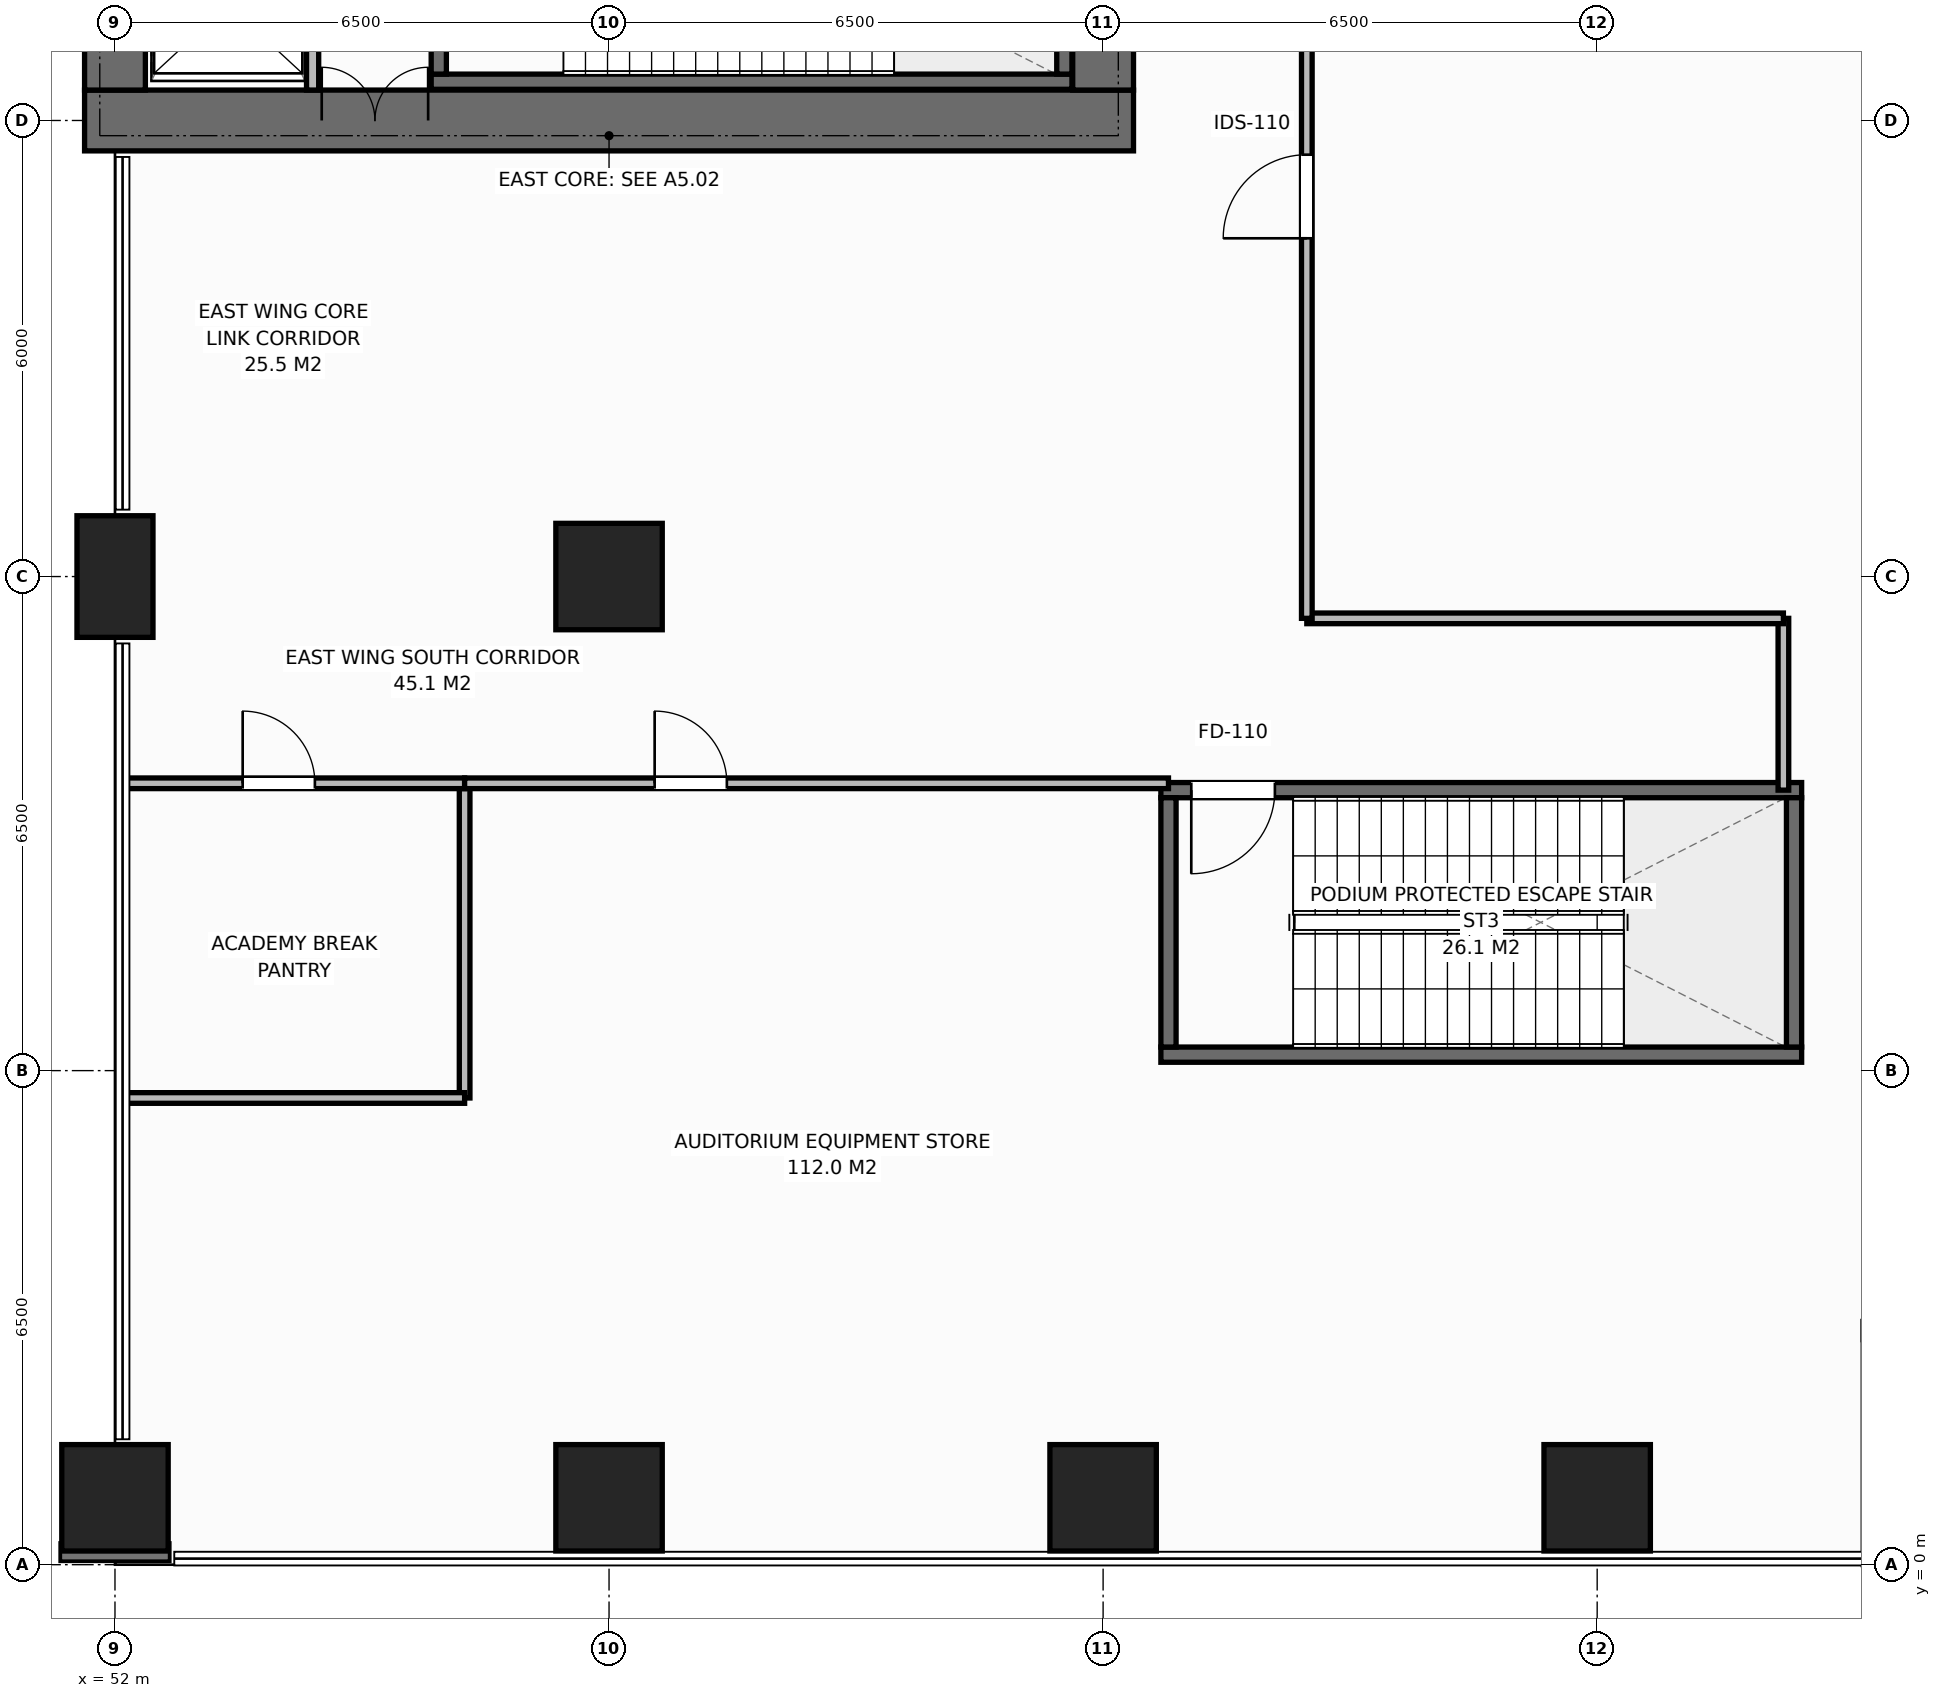
"""IFC4 building model, lengths in metres.
Left out: names, types, materials, properties, quantities, classifications, styles, units other than length and angle.
Written with IfcOpenShell. Run it as: python <this file> out.ifc"""

import sys

from ifc_helpers import new_model, si_unit, direction, frame, frame_2d, origin, origin_2d, place, context, subcontext, project, spatial, rectangle, extrude, element, fill, save


model = new_model("IFC4")
c1 = context("Model", 3, precision=1e-05, world=origin(), true_north=direction((0.0, 1.0)))
c2 = subcontext(c1, "Body", "Model", "MODEL_VIEW")
j1 = project(units=[si_unit("LENGTHUNIT", "METRE"), si_unit("PLANEANGLEUNIT", "RADIAN")], contexts=[c1])
p1 = place(None, origin())
s1 = spatial("IfcSite", under=j1, at=p1, CompositionType="ELEMENT")
p2 = place(p1, origin())
s2 = spatial("IfcBuilding", under=s1, at=p2, CompositionType="ELEMENT")
p3 = place(p2, frame((0.0, 0.0, 11.5)))
s3 = spatial("IfcBuildingStorey", under=s2, at=p3, CompositionType="ELEMENT", Elevation=11.5)
p4 = place(p3, frame((51.6, 19.0, 0.0), z_axis=(0.0, 0.0, 1.0), x_axis=(1.0, 0.0, 0.0)))
e1 = element("IfcWall", 1, at=p4, inside=s3, PredefinedType="SHEAR", context=c2, shape_type="SweptSolid", body=[
    extrude(rectangle(XDim=13.8, YDim=0.8, at=frame_2d((6.9, 0.0))), origin(), (0.0, 0.0, 1.0), 5.5),
])
p5 = place(p4, frame((3.12, 0.0, 0.0)))
e2 = element("IfcOpeningElement", 2, at=p5, cuts=e1, PredefinedType="OPENING", context=c2, shape_type="SweptSolid", body=[
    extrude(rectangle(XDim=1.4, YDim=2.2, at=frame_2d((0.7, 1.1))), frame((0.0, 0.41, 0.0), z_axis=(0.0, -1.0, 0.0), x_axis=(1.0, 0.0, 0.0)), (0.0, 0.0, 1.0), 0.82),
])
p6 = place(p3, frame((52.0, 19.4, 0.0), z_axis=(0.0, 0.0, 1.0), x_axis=(0.0, 1.0, 0.0)))
e3 = element("IfcWall", 3, at=p6, inside=s3, PredefinedType="SHEAR", context=c2, shape_type="SweptSolid", body=[
    extrude(rectangle(XDim=13.2, YDim=0.8, at=frame_2d((6.6, 0.0))), origin(), (0.0, 0.0, 1.0), 5.5),
])
p7 = place(p3, frame((65.0, 19.4, 0.0), z_axis=(0.0, 0.0, 1.0), x_axis=(0.0, 1.0, 0.0)))
e4 = element("IfcWall", 4, at=p7, inside=s3, PredefinedType="SHEAR", context=c2, shape_type="SweptSolid", body=[
    extrude(rectangle(XDim=13.2, YDim=0.8, at=frame_2d((6.6, 0.0))), origin(), (0.0, 0.0, 1.0), 5.5),
])
p8 = place(p7, frame((8.05, 0.0, 0.0)))
e5 = element("IfcOpeningElement", 5, at=p8, cuts=e4, PredefinedType="OPENING", context=c2, shape_type="SweptSolid", body=[
    extrude(rectangle(XDim=1.3, YDim=2.2, at=frame_2d((0.65, 1.1))), frame((0.0, 0.41, 0.0), z_axis=(0.0, -1.0, 0.0), x_axis=(1.0, 0.0, 0.0)), (0.0, 0.0, 1.0), 0.82),
])
p9 = place(p3, frame((56.16, 19.51, 0.0), z_axis=(0.0, 0.0, 1.0), x_axis=(1.0, 0.0, 0.0)))
e6 = element("IfcWall", 6, at=p9, inside=s3, PredefinedType="SHEAR", context=c2, shape_type="SweptSolid", body=[
    extrude(rectangle(XDim=8.43, YDim=0.2, at=frame_2d((4.215, 0.0))), origin(), (0.0, 0.0, 1.0), 5.5),
])
for number, where, z_axis, x_axis in (
    (7, (56.26, 19.61, 0.0), (0.0, 0.0, 1.0), (0.0, 1.0, 0.0)),
    (8, (64.49, 19.61, 0.0), (0.0, 0.0, 1.0), (0.0, 1.0, 0.0)),
):
    element("IfcWall", number, at=place(p3, frame(where, z_axis=z_axis, x_axis=x_axis)), inside=s3, PredefinedType="SHEAR", context=c2, shape_type="SweptSolid", body=[
        extrude(rectangle(XDim=3.28, YDim=0.2, at=frame_2d((1.64, 0.0))), origin(), (0.0, 0.0, 1.0), 5.5),
    ])
p10 = place(p3, frame((65.76, 6.71, 0.0), z_axis=(0.0, 0.0, 1.0), x_axis=(1.0, 0.0, 0.0)))
e9 = element("IfcWall", 9, at=p10, inside=s3, PredefinedType="SHEAR", context=c2, shape_type="SweptSolid", body=[
    extrude(rectangle(XDim=8.43, YDim=0.2, at=frame_2d((4.215, 0.0))), origin(), (0.0, 0.0, 1.0), 5.5),
])
p11 = place(p3, frame((65.76, 10.19, 0.0), z_axis=(0.0, 0.0, 1.0), x_axis=(1.0, 0.0, 0.0)))
e10 = element("IfcWall", 10, at=p11, inside=s3, PredefinedType="SHEAR", context=c2, shape_type="SweptSolid", body=[
    extrude(rectangle(XDim=8.43, YDim=0.2, at=frame_2d((4.215, 0.0))), origin(), (0.0, 0.0, 1.0), 5.5),
])
p12 = place(p11, frame((0.4, 0.0, 0.0)))
e11 = element("IfcOpeningElement", 11, at=p12, cuts=e10, PredefinedType="OPENING", context=c2, shape_type="SweptSolid", body=[
    extrude(rectangle(XDim=1.1, YDim=2.15, at=frame_2d((0.55, 1.075))), frame((0.0, 0.11, 0.0), z_axis=(0.0, -1.0, 0.0), x_axis=(1.0, 0.0, 0.0)), (0.0, 0.0, 1.0), 0.22),
])
for number, where, z_axis, x_axis in (
    (12, (65.86, 6.81, 0.0), (0.0, 0.0, 1.0), (0.0, 1.0, 0.0)),
    (13, (74.09, 6.81, 0.0), (0.0, 0.0, 1.0), (0.0, 1.0, 0.0)),
):
    element("IfcWall", number, at=place(p3, frame(where, z_axis=z_axis, x_axis=x_axis)), inside=s3, PredefinedType="SHEAR", context=c2, shape_type="SweptSolid", body=[
        extrude(rectangle(XDim=3.28, YDim=0.2, at=frame_2d((1.64, 0.0))), origin(), (0.0, 0.0, 1.0), 5.5),
    ])
p13 = place(p3, frame((58.5, 13.0, 0.0), z_axis=(0.0, 0.0, 1.0), x_axis=(1.0, 0.0, 0.0)))
e14 = element("IfcColumn", 14, at=p13, inside=s3, PredefinedType="COLUMN", context=c2, shape_type="SweptSolid", body=[
    extrude(rectangle(XDim=1.4, YDim=1.4, at=origin_2d()), origin(), (0.0, 0.0, 1.0), 5.5),
])
p14 = place(p3, frame((52.0, 13.0, 0.0), z_axis=(0.0, 0.0, 1.0), x_axis=(1.0, 0.0, 0.0)))
e15 = element("IfcColumn", 15, at=p14, inside=s3, PredefinedType="PILASTER", context=c2, shape_type="SweptSolid", body=[
    extrude(rectangle(XDim=1.0, YDim=1.6, at=origin_2d()), origin(), (0.0, 0.0, 1.0), 5.5),
])
for number, where, z_axis, x_axis in (
    (16, (52.0, 0.88, 0.0), (0.0, 0.0, 1.0), (1.0, 0.0, 0.0)),
    (17, (58.5, 0.88, 0.0), (0.0, 0.0, 1.0), (1.0, 0.0, 0.0)),
    (18, (65.0, 0.88, 0.0), (0.0, 0.0, 1.0), (1.0, 0.0, 0.0)),
    (19, (71.5, 0.88, 0.0), (0.0, 0.0, 1.0), (1.0, 0.0, 0.0)),
):
    element("IfcColumn", number, at=place(p3, frame(where, z_axis=z_axis, x_axis=x_axis)), inside=s3, PredefinedType="COLUMN", context=c2, shape_type="SweptSolid", body=[
        extrude(rectangle(XDim=1.4, YDim=1.4, at=origin_2d()), origin(), (0.0, 0.0, 1.0), 5.5),
    ])
p15 = place(p3, frame((54.6, 19.4, 0.0), z_axis=(0.0, 0.0, 1.0), x_axis=(0.0, 1.0, 0.0)))
e20 = element("IfcWall", 20, at=p15, inside=s3, PredefinedType="STANDARD", context=c2, shape_type="SweptSolid", body=[
    extrude(rectangle(XDim=13.2, YDim=0.16, at=frame_2d((6.6, 0.0))), origin(), (0.0, 0.0, 1.0), 5.22),
])
p16 = place(p15, frame((0.55, 0.0, 0.0)))
e21 = element("IfcOpeningElement", 21, at=p16, cuts=e20, PredefinedType="OPENING", context=c2, shape_type="SweptSolid", body=[
    extrude(rectangle(XDim=1.1, YDim=2.2, at=frame_2d((0.55, 1.1))), frame((0.0, 0.09, 0.0), z_axis=(0.0, -1.0, 0.0), x_axis=(1.0, 0.0, 0.0)), (0.0, 0.0, 1.0), 0.18),
])
p17 = place(p15, frame((2.7, 0.0, 0.0)))
e22 = element("IfcOpeningElement", 22, at=p17, cuts=e20, PredefinedType="OPENING", context=c2, shape_type="SweptSolid", body=[
    extrude(rectangle(XDim=1.1, YDim=2.2, at=frame_2d((0.55, 1.1))), frame((0.0, 0.09, 0.0), z_axis=(0.0, -1.0, 0.0), x_axis=(1.0, 0.0, 0.0)), (0.0, 0.0, 1.0), 0.18),
])
p18 = place(p3, frame((56.6, 6.14, 0.0), z_axis=(0.0, 0.0, 1.0), x_axis=(0.0, 1.0, 0.0)))
e23 = element("IfcWall", 23, at=p18, inside=s3, PredefinedType="PARTITIONING", context=c2, shape_type="SweptSolid", body=[
    extrude(rectangle(XDim=4.14, YDim=0.14, at=frame_2d((2.07, 0.0))), origin(), (0.0, 0.0, 1.0), 5.22),
])
p19 = place(p3, frame((52.08, 6.14, 0.0), z_axis=(0.0, 0.0, 1.0), x_axis=(1.0, 0.0, 0.0)))
e24 = element("IfcWall", 24, at=p19, inside=s3, PredefinedType="PARTITIONING", context=c2, shape_type="SweptSolid", body=[
    extrude(rectangle(XDim=4.52, YDim=0.14, at=frame_2d((2.26, 0.0))), origin(), (0.0, 0.0, 1.0), 5.22),
])
p20 = place(p3, frame((73.95, 10.19, 0.0), z_axis=(0.0, 0.0, 1.0), x_axis=(0.0, 1.0, 0.0)))
e25 = element("IfcWall", 25, at=p20, inside=s3, PredefinedType="PARTITIONING", context=c2, shape_type="SweptSolid", body=[
    extrude(rectangle(XDim=2.26, YDim=0.14, at=frame_2d((1.13, 0.0))), origin(), (0.0, 0.0, 1.0), 5.22),
])
p21 = place(p3, frame((67.68, 12.45, 0.0), z_axis=(0.0, 0.0, 1.0), x_axis=(1.0, 0.0, 0.0)))
e26 = element("IfcWall", 26, at=p21, inside=s3, PredefinedType="PARTITIONING", context=c2, shape_type="SweptSolid", body=[
    extrude(rectangle(XDim=6.27, YDim=0.14, at=frame_2d((3.135, 0.0))), origin(), (0.0, 0.0, 1.0), 5.22),
])
p22 = place(p3, frame((67.68, 12.45, 0.0), z_axis=(0.0, 0.0, 1.0), x_axis=(0.0, 1.0, 0.0)))
e27 = element("IfcWall", 27, at=p22, inside=s3, PredefinedType="PARTITIONING", context=c2, shape_type="SweptSolid", body=[
    extrude(rectangle(XDim=23.13, YDim=0.14, at=frame_2d((11.565, 0.0))), origin(), (0.0, 0.0, 1.0), 5.22),
])
p23 = place(p22, frame((5.0, 0.0, 0.0)))
e28 = element("IfcOpeningElement", 28, at=p23, cuts=e27, PredefinedType="OPENING", context=c2, shape_type="SweptSolid", body=[
    extrude(rectangle(XDim=1.1, YDim=2.15, at=frame_2d((0.55, 1.075))), frame((0.0, 0.08, 0.0), z_axis=(0.0, -1.0, 0.0), x_axis=(1.0, 0.0, 0.0)), (0.0, 0.0, 1.0), 0.16),
])
p24 = place(p3, frame((52.08, 10.28, 0.0), z_axis=(0.0, 0.0, 1.0), x_axis=(1.0, 0.0, 0.0)))
e29 = element("IfcWall", 29, at=p24, inside=s3, PredefinedType="PARTITIONING", context=c2, shape_type="SweptSolid", body=[
    extrude(rectangle(XDim=4.52, YDim=0.14, at=frame_2d((2.26, 0.0))), origin(), (0.0, 0.0, 1.0), 5.22),
])
p25 = place(p24, frame((1.6, 0.0, 0.0)))
e30 = element("IfcOpeningElement", 30, at=p25, cuts=e29, PredefinedType="OPENING", context=c2, shape_type="SweptSolid", body=[
    extrude(rectangle(XDim=0.95, YDim=2.15, at=frame_2d((0.475, 1.075))), frame((0.0, 0.08, 0.0), z_axis=(0.0, -1.0, 0.0), x_axis=(1.0, 0.0, 0.0)), (0.0, 0.0, 1.0), 0.16),
])
p26 = place(p3, frame((56.6, 10.28, 0.0), z_axis=(0.0, 0.0, 1.0), x_axis=(1.0, 0.0, 0.0)))
e31 = element("IfcWall", 31, at=p26, inside=s3, PredefinedType="PARTITIONING", context=c2, shape_type="SweptSolid", body=[
    extrude(rectangle(XDim=9.26, YDim=0.14, at=frame_2d((4.63, 0.0))), origin(), (0.0, 0.0, 1.0), 5.22),
])
p27 = place(p26, frame((2.5, 0.0, 0.0)))
e32 = element("IfcOpeningElement", 32, at=p27, cuts=e31, PredefinedType="OPENING", context=c2, shape_type="SweptSolid", body=[
    extrude(rectangle(XDim=0.95, YDim=2.15, at=frame_2d((0.475, 1.075))), frame((0.0, 0.08, 0.0), z_axis=(0.0, -1.0, 0.0), x_axis=(1.0, 0.0, 0.0)), (0.0, 0.0, 1.0), 0.16),
])
p28 = place(p5, origin())
e33 = element("IfcDoor", 33, at=p28, inside=s3, OperationType="DOUBLE_DOOR_SINGLE_SWING", PredefinedType="DOOR", context=c2, shape_type="SweptSolid", body=[
    extrude(rectangle(XDim=1.4, YDim=2.2, at=frame_2d((0.7, 1.1))), frame((0.0, 0.125, 0.0), z_axis=(0.0, -1.0, 0.0), x_axis=(1.0, 0.0, 0.0)), (0.0, 0.0, 1.0), 0.05),
])
fill(e2, e33)
p29 = place(p12, origin())
e34 = element("IfcDoor", 34, at=p29, inside=s3, OperationType="SINGLE_SWING_RIGHT", PredefinedType="DOOR", context=c2, shape_type="SweptSolid", body=[
    extrude(rectangle(XDim=1.1, YDim=2.15, at=frame_2d((0.55, 1.075))), frame((0.0, 0.025, 0.0), z_axis=(0.0, -1.0, 0.0), x_axis=(1.0, 0.0, 0.0)), (0.0, 0.0, 1.0), 0.05),
])
fill(e11, e34)
p30 = place(p23, origin())
e35 = element("IfcDoor", 35, at=p30, inside=s3, OperationType="SINGLE_SWING_LEFT", PredefinedType="DOOR", context=c2, shape_type="SweptSolid", body=[
    extrude(rectangle(XDim=1.1, YDim=2.15, at=frame_2d((0.55, 1.075))), frame((0.0, 0.025, 0.0), z_axis=(0.0, -1.0, 0.0), x_axis=(1.0, 0.0, 0.0)), (0.0, 0.0, 1.0), 0.05),
])
fill(e28, e35)
p31 = place(p25, origin())
e36 = element("IfcDoor", 36, at=p31, inside=s3, OperationType="SINGLE_SWING_LEFT", PredefinedType="DOOR", context=c2, shape_type="SweptSolid", body=[
    extrude(rectangle(XDim=0.95, YDim=2.15, at=frame_2d((0.475, 1.075))), frame((0.0, 0.025, 0.0), z_axis=(0.0, -1.0, 0.0), x_axis=(1.0, 0.0, 0.0)), (0.0, 0.0, 1.0), 0.05),
])
fill(e30, e36)
p32 = place(p27, origin())
e37 = element("IfcDoor", 37, at=p32, inside=s3, OperationType="SINGLE_SWING_LEFT", PredefinedType="DOOR", context=c2, shape_type="SweptSolid", body=[
    extrude(rectangle(XDim=0.95, YDim=2.15, at=frame_2d((0.475, 1.075))), frame((0.0, 0.025, 0.0), z_axis=(0.0, -1.0, 0.0), x_axis=(1.0, 0.0, 0.0)), (0.0, 0.0, 1.0), 0.05),
])
fill(e32, e37)
save(model, sys.argv[1])
